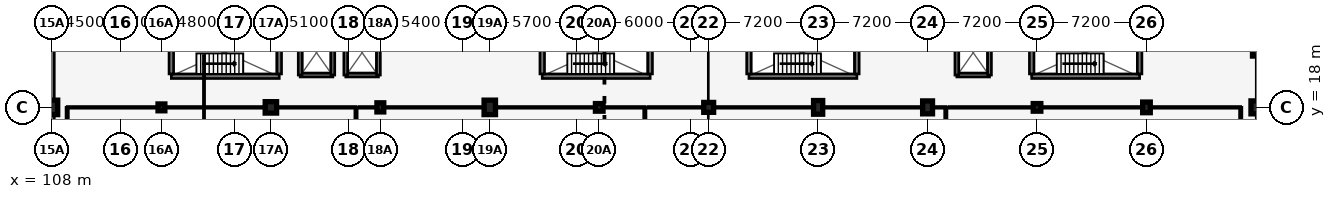
"""IFC4 building model, lengths in metres.
Left out: names, types, materials, properties, quantities, classifications, styles, units other than length and angle.
Written with IfcOpenShell. Run it as: python <this file> out.ifc"""

import sys

from ifc_helpers import new_model, si_unit, direction, frame, frame_2d, origin, origin_2d, place, context, subcontext, project, spatial, rectangle, circle, extrude, element, fill, save


model = new_model("IFC4")
c1 = context("Model", 3, precision=1e-05, world=origin(), true_north=direction((0.0, 1.0)))
c2 = subcontext(c1, "Body", "Model", "MODEL_VIEW")
j1 = project(units=[si_unit("LENGTHUNIT", "METRE"), si_unit("PLANEANGLEUNIT", "RADIAN")], contexts=[c1])
p1 = place(None, origin())
s1 = spatial("IfcSite", under=j1, at=p1, CompositionType="ELEMENT")
p2 = place(p1, origin())
s2 = spatial("IfcBuilding", under=s1, at=p2, CompositionType="ELEMENT")
p3 = place(p2, frame((0.0, 0.0, 4.8)))
s3 = spatial("IfcBuildingStorey", under=s2, at=p3, CompositionType="ELEMENT", Elevation=4.8)
p4 = place(p3, frame((108.0, 18.0, 0.0), z_axis=(0.0, 0.0, 1.0), x_axis=(1.0, 0.0, 0.0)))
e1 = element("IfcColumn", 1, at=p4, inside=s3, PredefinedType="COLUMN", context=c2, shape_type="SweptSolid", body=[
    extrude(rectangle(XDim=0.75, YDim=0.95, at=origin_2d()), origin(), (0.0, 0.0, 1.0), 4.2),
])
p5 = place(p3, frame((115.2, 18.0, 0.0), z_axis=(0.0, 0.0, 1.0), x_axis=(1.0, 0.0, 0.0)))
e2 = element("IfcColumn", 2, at=p5, inside=s3, PredefinedType="COLUMN", context=c2, shape_type="SweptSolid", body=[
    extrude(rectangle(XDim=0.45, YDim=0.45, at=origin_2d()), origin(), (0.0, 0.0, 1.0), 4.2),
])
p6 = place(p3, frame((122.4, 18.0, 0.0), z_axis=(0.0, 0.0, 1.0), x_axis=(1.0, 0.0, 0.0)))
e3 = element("IfcColumn", 3, at=p6, inside=s3, PredefinedType="COLUMN", context=c2, shape_type="SweptSolid", body=[
    extrude(rectangle(XDim=0.75, YDim=0.75, at=origin_2d()), origin(), (0.0, 0.0, 1.0), 4.2),
])
p7 = place(p3, frame((129.6, 18.0, 0.0), z_axis=(0.0, 0.0, 1.0), x_axis=(1.0, 0.0, 0.0)))
e4 = element("IfcColumn", 4, at=p7, inside=s3, PredefinedType="COLUMN", context=c2, shape_type="SweptSolid", body=[
    extrude(rectangle(XDim=0.45, YDim=0.6, at=origin_2d()), origin(), (0.0, 0.0, 1.0), 4.2),
])
p8 = place(p3, frame((136.8, 18.0, 0.0), z_axis=(0.0, 0.0, 1.0), x_axis=(1.0, 0.0, 0.0)))
e5 = element("IfcColumn", 5, at=p8, inside=s3, PredefinedType="COLUMN", context=c2, shape_type="SweptSolid", body=[
    extrude(rectangle(XDim=0.75, YDim=0.95, at=origin_2d()), origin(), (0.0, 0.0, 1.0), 4.2),
])
p9 = place(p3, frame((144.0, 18.0, 0.0), z_axis=(0.0, 0.0, 1.0), x_axis=(1.0, 0.0, 0.0)))
e6 = element("IfcColumn", 6, at=p9, inside=s3, PredefinedType="COLUMN", context=c2, shape_type="SweptSolid", body=[
    extrude(circle(Radius=0.25, at=origin_2d()), origin(), (0.0, 0.0, 1.0), 4.2),
])
p10 = place(p3, frame((151.2, 18.0, 0.0), z_axis=(0.0, 0.0, 1.0), x_axis=(1.0, 0.0, 0.0)))
e7 = element("IfcColumn", 7, at=p10, inside=s3, PredefinedType="COLUMN", context=c2, shape_type="SweptSolid", body=[
    extrude(rectangle(XDim=0.65, YDim=0.65, at=origin_2d()), origin(), (0.0, 0.0, 1.0), 4.2),
])
p11 = place(p3, frame((158.4, 18.0, 0.0), z_axis=(0.0, 0.0, 1.0), x_axis=(1.0, 0.0, 0.0)))
e8 = element("IfcColumn", 8, at=p11, inside=s3, PredefinedType="COLUMN", context=c2, shape_type="SweptSolid", body=[
    extrude(rectangle(XDim=0.6, YDim=0.9, at=origin_2d()), origin(), (0.0, 0.0, 1.0), 4.2),
])
p12 = place(p3, frame((165.6, 18.0, 0.0), z_axis=(0.0, 0.0, 1.0), x_axis=(1.0, 0.0, 0.0)))
e9 = element("IfcColumn", 9, at=p12, inside=s3, PredefinedType="COLUMN", context=c2, shape_type="SweptSolid", body=[
    extrude(rectangle(XDim=0.65, YDim=0.85, at=origin_2d()), origin(), (0.0, 0.0, 1.0), 4.2),
])
p13 = place(p3, frame((172.8, 18.0, 0.0), z_axis=(0.0, 0.0, 1.0), x_axis=(1.0, 0.0, 0.0)))
e10 = element("IfcColumn", 10, at=p13, inside=s3, PredefinedType="COLUMN", context=c2, shape_type="SweptSolid", body=[
    extrude(rectangle(XDim=0.5, YDim=0.5, at=origin_2d()), origin(), (0.0, 0.0, 1.0), 4.2),
])
p14 = place(p3, frame((180.0, 18.0, 0.0), z_axis=(0.0, 0.0, 1.0), x_axis=(1.0, 0.0, 0.0)))
e11 = element("IfcColumn", 11, at=p14, inside=s3, PredefinedType="COLUMN", context=c2, shape_type="SweptSolid", body=[
    extrude(rectangle(XDim=0.5, YDim=0.7, at=origin_2d()), origin(), (0.0, 0.0, 1.0), 4.2),
])
p15 = place(p3, frame((187.2, 18.0, 0.0), z_axis=(0.0, 0.0, 1.0), x_axis=(1.0, 0.0, 0.0)))
e12 = element("IfcColumn", 12, at=p15, inside=s3, PredefinedType="COLUMN", context=c2, shape_type="SweptSolid", body=[
    extrude(rectangle(XDim=0.65, YDim=0.85, at=origin_2d()), origin(), (0.0, 0.0, 1.0), 4.2),
])
p16 = place(p3, frame((187.2, 21.6, 0.0), z_axis=(0.0, 0.0, 1.0), x_axis=(1.0, 0.0, 0.0)))
e13 = element("IfcColumn", 13, at=p16, inside=s3, PredefinedType="COLUMN", context=c2, shape_type="SweptSolid", body=[
    extrude(rectangle(XDim=0.45, YDim=0.45, at=origin_2d()), origin(), (0.0, 0.0, 1.0), 4.2),
])
p17 = place(p3, frame((108.0, 54.0, 0.0), z_axis=(0.0, 0.0, 1.0), x_axis=(0.0, -1.0, 0.0)))
e14 = element("IfcWall", 14, at=p17, inside=s3, PredefinedType="SOLIDWALL", context=c2, shape_type="SweptSolid", body=[
    extrude(rectangle(XDim=43.2, YDim=0.3, at=frame_2d((21.6, 0.0))), origin(), (0.0, 0.0, 1.0), 3.5),
])
p18 = place(p17, frame((2.2, 0.0, 0.72)))
e15 = element("IfcOpeningElement", 15, at=p18, cuts=e14, PredefinedType="OPENING", context=c2, shape_type="SweptSolid", body=[
    extrude(rectangle(XDim=1.8, YDim=2.15, at=frame_2d((0.9, 1.075))), frame((0.0, 0.16, 0.0), z_axis=(0.0, -1.0, 0.0), x_axis=(1.0, 0.0, 0.0)), (0.0, 0.0, 1.0), 0.32),
])
p19 = place(p17, frame((16.6, 0.0, 0.72)))
e16 = element("IfcOpeningElement", 16, at=p19, cuts=e14, PredefinedType="OPENING", context=c2, shape_type="SweptSolid", body=[
    extrude(rectangle(XDim=1.35, YDim=2.05, at=frame_2d((0.675, 1.025))), frame((0.0, 0.16, 0.0), z_axis=(0.0, -1.0, 0.0), x_axis=(1.0, 0.0, 0.0)), (0.0, 0.0, 1.0), 0.32),
])
p20 = place(p17, frame((23.8, 0.0, 0.72)))
e17 = element("IfcOpeningElement", 17, at=p20, cuts=e14, PredefinedType="OPENING", context=c2, shape_type="SweptSolid", body=[
    extrude(rectangle(XDim=1.5, YDim=2.1, at=frame_2d((0.75, 1.05))), frame((0.0, 0.16, 0.0), z_axis=(0.0, -1.0, 0.0), x_axis=(1.0, 0.0, 0.0)), (0.0, 0.0, 1.0), 0.32),
])
p21 = place(p17, frame((31.0, 0.0, 0.72)))
e18 = element("IfcOpeningElement", 18, at=p21, cuts=e14, PredefinedType="OPENING", context=c2, shape_type="SweptSolid", body=[
    extrude(rectangle(XDim=1.65, YDim=2.1, at=frame_2d((0.825, 1.05))), frame((0.0, 0.16, 0.0), z_axis=(0.0, -1.0, 0.0), x_axis=(1.0, 0.0, 0.0)), (0.0, 0.0, 1.0), 0.32),
])
p22 = place(p3, frame((115.85, 20.05, 0.0), z_axis=(0.0, 0.0, 1.0), x_axis=(1.0, 0.0, 0.0)))
e19 = element("IfcWall", 19, at=p22, inside=s3, PredefinedType="SHEAR", context=c2, shape_type="SweptSolid", body=[
    extrude(rectangle(XDim=7.1, YDim=0.3, at=frame_2d((3.55, 0.0))), origin(), (0.0, 0.0, 1.0), 3.84),
])
p23 = place(p22, frame((0.35, 0.0, 0.0)))
e20 = element("IfcOpeningElement", 20, at=p23, cuts=e19, PredefinedType="OPENING", context=c2, shape_type="SweptSolid", body=[
    extrude(rectangle(XDim=1.07, YDim=2.15, at=frame_2d((0.535, 1.075))), frame((0.0, 0.16, 0.0), z_axis=(0.0, -1.0, 0.0), x_axis=(1.0, 0.0, 0.0)), (0.0, 0.0, 1.0), 0.32),
])
for number, where, z_axis, x_axis in (
    (21, (122.95, 20.2, 0.0), (0.0, 0.0, 1.0), (0.0, 1.0, 0.0)),
    (22, (115.85, 23.1, 0.0), (0.0, 0.0, 1.0), (0.0, -1.0, 0.0)),
):
    element("IfcWall", number, at=place(p3, frame(where, z_axis=z_axis, x_axis=x_axis)), inside=s3, PredefinedType="SHEAR", context=c2, shape_type="SweptSolid", body=[
        extrude(rectangle(XDim=2.9, YDim=0.3, at=frame_2d((1.45, 0.0))), origin(), (0.0, 0.0, 1.0), 3.84),
    ])
p24 = place(p3, frame((140.25, 20.05, 0.0), z_axis=(0.0, 0.0, 1.0), x_axis=(1.0, 0.0, 0.0)))
e23 = element("IfcWall", 23, at=p24, inside=s3, PredefinedType="SHEAR", context=c2, shape_type="SweptSolid", body=[
    extrude(rectangle(XDim=7.1, YDim=0.3, at=frame_2d((3.55, 0.0))), origin(), (0.0, 0.0, 1.0), 3.84),
])
p25 = place(p24, frame((0.35, 0.0, 0.0)))
e24 = element("IfcOpeningElement", 24, at=p25, cuts=e23, PredefinedType="OPENING", context=c2, shape_type="SweptSolid", body=[
    extrude(rectangle(XDim=1.07, YDim=2.15, at=frame_2d((0.535, 1.075))), frame((0.0, 0.16, 0.0), z_axis=(0.0, -1.0, 0.0), x_axis=(1.0, 0.0, 0.0)), (0.0, 0.0, 1.0), 0.32),
])
for number, where, z_axis, x_axis in (
    (25, (147.35, 20.2, 0.0), (0.0, 0.0, 1.0), (0.0, 1.0, 0.0)),
    (26, (140.25, 23.1, 0.0), (0.0, 0.0, 1.0), (0.0, -1.0, 0.0)),
):
    element("IfcWall", number, at=place(p3, frame(where, z_axis=z_axis, x_axis=x_axis)), inside=s3, PredefinedType="SHEAR", context=c2, shape_type="SweptSolid", body=[
        extrude(rectangle(XDim=2.9, YDim=0.3, at=frame_2d((1.45, 0.0))), origin(), (0.0, 0.0, 1.0), 3.84),
    ])
p26 = place(p3, frame((153.85, 20.05, 0.0), z_axis=(0.0, 0.0, 1.0), x_axis=(1.0, 0.0, 0.0)))
e27 = element("IfcWall", 27, at=p26, inside=s3, PredefinedType="SHEAR", context=c2, shape_type="SweptSolid", body=[
    extrude(rectangle(XDim=7.1, YDim=0.3, at=frame_2d((3.55, 0.0))), origin(), (0.0, 0.0, 1.0), 3.84),
])
p27 = place(p26, frame((0.35, 0.0, 0.0)))
e28 = element("IfcOpeningElement", 28, at=p27, cuts=e27, PredefinedType="OPENING", context=c2, shape_type="SweptSolid", body=[
    extrude(rectangle(XDim=1.07, YDim=2.15, at=frame_2d((0.535, 1.075))), frame((0.0, 0.16, 0.0), z_axis=(0.0, -1.0, 0.0), x_axis=(1.0, 0.0, 0.0)), (0.0, 0.0, 1.0), 0.32),
])
for number, where, z_axis, x_axis in (
    (29, (160.95, 20.2, 0.0), (0.0, 0.0, 1.0), (0.0, 1.0, 0.0)),
    (30, (153.85, 23.1, 0.0), (0.0, 0.0, 1.0), (0.0, -1.0, 0.0)),
):
    element("IfcWall", number, at=place(p3, frame(where, z_axis=z_axis, x_axis=x_axis)), inside=s3, PredefinedType="SHEAR", context=c2, shape_type="SweptSolid", body=[
        extrude(rectangle(XDim=2.9, YDim=0.3, at=frame_2d((1.45, 0.0))), origin(), (0.0, 0.0, 1.0), 3.84),
    ])
p28 = place(p3, frame((172.45, 20.05, 0.0), z_axis=(0.0, 0.0, 1.0), x_axis=(1.0, 0.0, 0.0)))
e31 = element("IfcWall", 31, at=p28, inside=s3, PredefinedType="SHEAR", context=c2, shape_type="SweptSolid", body=[
    extrude(rectangle(XDim=7.1, YDim=0.3, at=frame_2d((3.55, 0.0))), origin(), (0.0, 0.0, 1.0), 3.84),
])
p29 = place(p28, frame((0.35, 0.0, 0.0)))
e32 = element("IfcOpeningElement", 32, at=p29, cuts=e31, PredefinedType="OPENING", context=c2, shape_type="SweptSolid", body=[
    extrude(rectangle(XDim=1.07, YDim=2.15, at=frame_2d((0.535, 1.075))), frame((0.0, 0.16, 0.0), z_axis=(0.0, -1.0, 0.0), x_axis=(1.0, 0.0, 0.0)), (0.0, 0.0, 1.0), 0.32),
])
for number, where, z_axis, x_axis in (
    (33, (179.55, 20.2, 0.0), (0.0, 0.0, 1.0), (0.0, 1.0, 0.0)),
    (34, (172.45, 23.1, 0.0), (0.0, 0.0, 1.0), (0.0, -1.0, 0.0)),
):
    element("IfcWall", number, at=place(p3, frame(where, z_axis=z_axis, x_axis=x_axis)), inside=s3, PredefinedType="SHEAR", context=c2, shape_type="SweptSolid", body=[
        extrude(rectangle(XDim=2.9, YDim=0.3, at=frame_2d((1.45, 0.0))), origin(), (0.0, 0.0, 1.0), 3.84),
    ])
p30 = place(p3, frame((124.325, 20.125, 0.0), z_axis=(0.0, 0.0, 1.0), x_axis=(1.0, 0.0, 0.0)))
e35 = element("IfcWall", 35, at=p30, inside=s3, PredefinedType="SHEAR", context=c2, shape_type="SweptSolid", body=[
    extrude(rectangle(XDim=2.15, YDim=0.25, at=frame_2d((1.075, 0.0))), origin(), (0.0, 0.0, 1.0), 3.9),
])
for number, where, z_axis, x_axis in (
    (36, (124.325, 23.075, 0.0), (0.0, 0.0, 1.0), (0.0, -1.0, 0.0)),
    (37, (126.475, 20.125, 0.0), (0.0, 0.0, 1.0), (0.0, 1.0, 0.0)),
):
    element("IfcWall", number, at=place(p3, frame(where, z_axis=z_axis, x_axis=x_axis)), inside=s3, PredefinedType="SHEAR", context=c2, shape_type="SweptSolid", body=[
        extrude(rectangle(XDim=2.95, YDim=0.25, at=frame_2d((1.475, 0.0))), origin(), (0.0, 0.0, 1.0), 3.9),
    ])
p31 = place(p3, frame((127.325, 20.125, 0.0), z_axis=(0.0, 0.0, 1.0), x_axis=(1.0, 0.0, 0.0)))
e38 = element("IfcWall", 38, at=p31, inside=s3, PredefinedType="SHEAR", context=c2, shape_type="SweptSolid", body=[
    extrude(rectangle(XDim=2.15, YDim=0.25, at=frame_2d((1.075, 0.0))), origin(), (0.0, 0.0, 1.0), 3.9),
])
for number, where, z_axis, x_axis in (
    (39, (127.325, 23.075, 0.0), (0.0, 0.0, 1.0), (0.0, -1.0, 0.0)),
    (40, (129.475, 20.125, 0.0), (0.0, 0.0, 1.0), (0.0, 1.0, 0.0)),
):
    element("IfcWall", number, at=place(p3, frame(where, z_axis=z_axis, x_axis=x_axis)), inside=s3, PredefinedType="SHEAR", context=c2, shape_type="SweptSolid", body=[
        extrude(rectangle(XDim=2.95, YDim=0.25, at=frame_2d((1.475, 0.0))), origin(), (0.0, 0.0, 1.0), 3.9),
    ])
p32 = place(p3, frame((167.525, 20.125, 0.0), z_axis=(0.0, 0.0, 1.0), x_axis=(1.0, 0.0, 0.0)))
e41 = element("IfcWall", 41, at=p32, inside=s3, PredefinedType="SHEAR", context=c2, shape_type="SweptSolid", body=[
    extrude(rectangle(XDim=2.15, YDim=0.25, at=frame_2d((1.075, 0.0))), origin(), (0.0, 0.0, 1.0), 3.9),
])
for number, where, z_axis, x_axis in (
    (42, (167.525, 23.075, 0.0), (0.0, 0.0, 1.0), (0.0, -1.0, 0.0)),
    (43, (169.675, 20.125, 0.0), (0.0, 0.0, 1.0), (0.0, 1.0, 0.0)),
):
    element("IfcWall", number, at=place(p3, frame(where, z_axis=z_axis, x_axis=x_axis)), inside=s3, PredefinedType="SHEAR", context=c2, shape_type="SweptSolid", body=[
        extrude(rectangle(XDim=2.95, YDim=0.25, at=frame_2d((1.475, 0.0))), origin(), (0.0, 0.0, 1.0), 3.9),
    ])
p33 = place(p3, frame((128.0, 11.85, 0.0), z_axis=(0.0, 0.0, 1.0), x_axis=(0.0, 1.0, 0.0)))
e44 = element("IfcWall", 44, at=p33, inside=s3, PredefinedType="PARTITIONING", context=c2, shape_type="SweptSolid", body=[
    extrude(rectangle(XDim=6.15, YDim=0.15, at=frame_2d((3.075, 0.0))), origin(), (0.0, 0.0, 1.0), 2.922),
])
p34 = place(p3, frame((109.0, 18.0, 0.0), z_axis=(0.0, 0.0, 1.0), x_axis=(0.0, -1.0, 0.0)))
e45 = element("IfcWall", 45, at=p34, inside=s3, PredefinedType="PARTITIONING", context=c2, shape_type="SweptSolid", body=[
    extrude(rectangle(XDim=6.15, YDim=0.15, at=frame_2d((3.075, 0.0))), origin(), (0.0, 0.0, 1.0), 3.022),
])
p35 = place(p3, frame((109.0, 18.0, 0.0), z_axis=(0.0, 0.0, 1.0), x_axis=(1.0, 0.0, 0.0)))
e46 = element("IfcWall", 46, at=p35, inside=s3, PredefinedType="PARTITIONING", context=c2, shape_type="SweptSolid", body=[
    extrude(rectangle(XDim=19.0, YDim=0.11, at=frame_2d((9.5, 0.0))), origin(), (0.0, 0.0, 1.0), 2.922),
])
p36 = place(p35, frame((8.98, 0.0, 0.0)))
e47 = element("IfcOpeningElement", 47, at=p36, cuts=e46, PredefinedType="OPENING", context=c2, shape_type="SweptSolid", body=[
    extrude(rectangle(XDim=1.04, YDim=2.15, at=frame_2d((0.52, 1.075))), frame((0.0, 0.065, 0.0), z_axis=(0.0, -1.0, 0.0), x_axis=(1.0, 0.0, 0.0)), (0.0, 0.0, 1.0), 0.13),
])
p37 = place(p3, frame((147.0, 11.85, 0.0), z_axis=(0.0, 0.0, 1.0), x_axis=(0.0, 1.0, 0.0)))
e48 = element("IfcWall", 48, at=p37, inside=s3, PredefinedType="PARTITIONING", context=c2, shape_type="SweptSolid", body=[
    extrude(rectangle(XDim=6.15, YDim=0.15, at=frame_2d((3.075, 0.0))), origin(), (0.0, 0.0, 1.0), 3.372),
])
p38 = place(p3, frame((128.2, 18.0, 0.0), z_axis=(0.0, 0.0, 1.0), x_axis=(1.0, 0.0, 0.0)))
e49 = element("IfcWall", 49, at=p38, inside=s3, PredefinedType="PARTITIONING", context=c2, shape_type="SweptSolid", body=[
    extrude(rectangle(XDim=18.8, YDim=0.11, at=frame_2d((9.4, 0.0))), origin(), (0.0, 0.0, 1.0), 2.822),
])
p39 = place(p38, frame((5.322, 0.0, 0.0)))
e50 = element("IfcOpeningElement", 50, at=p39, cuts=e49, PredefinedType="OPENING", context=c2, shape_type="SweptSolid", body=[
    extrude(rectangle(XDim=1.06, YDim=2.15, at=frame_2d((0.53, 1.075))), frame((0.0, 0.065, 0.0), z_axis=(0.0, -1.0, 0.0), x_axis=(1.0, 0.0, 0.0)), (0.0, 0.0, 1.0), 0.13),
])
p40 = place(p3, frame((166.8, 11.85, 0.0), z_axis=(0.0, 0.0, 1.0), x_axis=(0.0, 1.0, 0.0)))
e51 = element("IfcWall", 51, at=p40, inside=s3, PredefinedType="PARTITIONING", context=c2, shape_type="SweptSolid", body=[
    extrude(rectangle(XDim=6.15, YDim=0.15, at=frame_2d((3.075, 0.0))), origin(), (0.0, 0.0, 1.0), 3.272),
])
p41 = place(p3, frame((147.2, 18.0, 0.0), z_axis=(0.0, 0.0, 1.0), x_axis=(1.0, 0.0, 0.0)))
e52 = element("IfcWall", 52, at=p41, inside=s3, PredefinedType="PARTITIONING", context=c2, shape_type="SweptSolid", body=[
    extrude(rectangle(XDim=19.6, YDim=0.11, at=frame_2d((9.8, 0.0))), origin(), (0.0, 0.0, 1.0), 3.222),
])
p42 = place(p41, frame((9.28, 0.0, 0.0)))
e53 = element("IfcOpeningElement", 53, at=p42, cuts=e52, PredefinedType="OPENING", context=c2, shape_type="SweptSolid", body=[
    extrude(rectangle(XDim=1.04, YDim=2.15, at=frame_2d((0.52, 1.075))), frame((0.0, 0.065, 0.0), z_axis=(0.0, -1.0, 0.0), x_axis=(1.0, 0.0, 0.0)), (0.0, 0.0, 1.0), 0.13),
])
p43 = place(p3, frame((186.2, 11.85, 0.0), z_axis=(0.0, 0.0, 1.0), x_axis=(0.0, 1.0, 0.0)))
e54 = element("IfcWall", 54, at=p43, inside=s3, PredefinedType="PARTITIONING", context=c2, shape_type="SweptSolid", body=[
    extrude(rectangle(XDim=6.15, YDim=0.15, at=frame_2d((3.075, 0.0))), origin(), (0.0, 0.0, 1.0), 3.222),
])
p44 = place(p3, frame((167.0, 18.0, 0.0), z_axis=(0.0, 0.0, 1.0), x_axis=(1.0, 0.0, 0.0)))
e55 = element("IfcWall", 55, at=p44, inside=s3, PredefinedType="PARTITIONING", context=c2, shape_type="SweptSolid", body=[
    extrude(rectangle(XDim=19.2, YDim=0.11, at=frame_2d((9.6, 0.0))), origin(), (0.0, 0.0, 1.0), 3.172),
])
p45 = place(p44, frame((8.7, 0.0, 0.0)))
e56 = element("IfcOpeningElement", 56, at=p45, cuts=e55, PredefinedType="OPENING", context=c2, shape_type="SweptSolid", body=[
    extrude(rectangle(XDim=1.8, YDim=2.2, at=frame_2d((0.9, 1.1))), frame((0.0, 0.065, 0.0), z_axis=(0.0, -1.0, 0.0), x_axis=(1.0, 0.0, 0.0)), (0.0, 0.0, 1.0), 0.13),
])
p46 = place(p21, origin())
e57 = element("IfcWindow", 57, at=p46, inside=s3, PartitioningType="SINGLE_PANEL", PredefinedType="WINDOW", context=c2, shape_type="SweptSolid", body=[
    extrude(rectangle(XDim=1.65, YDim=2.1, at=frame_2d((0.825, 1.05))), frame((0.0, 0.03, 0.0), z_axis=(0.0, -1.0, 0.0), x_axis=(1.0, 0.0, 0.0)), (0.0, 0.0, 1.0), 0.06),
])
fill(e18, e57)
p47 = place(p23, origin())
e58 = element("IfcDoor", 58, at=p47, inside=s3, OperationType="SINGLE_SWING_RIGHT", PredefinedType="DOOR", context=c2, shape_type="SweptSolid", body=[
    extrude(rectangle(XDim=1.07, YDim=2.15, at=frame_2d((0.535, 1.075))), frame((0.0, 0.025, 0.0), z_axis=(0.0, -1.0, 0.0), x_axis=(1.0, 0.0, 0.0)), (0.0, 0.0, 1.0), 0.05),
])
fill(e20, e58)
p48 = place(p25, origin())
e59 = element("IfcDoor", 59, at=p48, inside=s3, OperationType="SINGLE_SWING_RIGHT", PredefinedType="DOOR", context=c2, shape_type="SweptSolid", body=[
    extrude(rectangle(XDim=1.07, YDim=2.15, at=frame_2d((0.535, 1.075))), frame((0.0, 0.025, 0.0), z_axis=(0.0, -1.0, 0.0), x_axis=(1.0, 0.0, 0.0)), (0.0, 0.0, 1.0), 0.05),
])
fill(e24, e59)
p49 = place(p27, origin())
e60 = element("IfcDoor", 60, at=p49, inside=s3, OperationType="SINGLE_SWING_RIGHT", PredefinedType="DOOR", context=c2, shape_type="SweptSolid", body=[
    extrude(rectangle(XDim=1.07, YDim=2.15, at=frame_2d((0.535, 1.075))), frame((0.0, 0.025, 0.0), z_axis=(0.0, -1.0, 0.0), x_axis=(1.0, 0.0, 0.0)), (0.0, 0.0, 1.0), 0.05),
])
fill(e28, e60)
p50 = place(p29, origin())
e61 = element("IfcDoor", 61, at=p50, inside=s3, OperationType="SINGLE_SWING_RIGHT", PredefinedType="DOOR", context=c2, shape_type="SweptSolid", body=[
    extrude(rectangle(XDim=1.07, YDim=2.15, at=frame_2d((0.535, 1.075))), frame((0.0, 0.025, 0.0), z_axis=(0.0, -1.0, 0.0), x_axis=(1.0, 0.0, 0.0)), (0.0, 0.0, 1.0), 0.05),
])
fill(e32, e61)
p51 = place(p36, origin())
e62 = element("IfcDoor", 62, at=p51, inside=s3, OperationType="SINGLE_SWING_LEFT", PredefinedType="DOOR", context=c2, shape_type="SweptSolid", body=[
    extrude(rectangle(XDim=1.04, YDim=2.15, at=frame_2d((0.52, 1.075))), frame((0.0, 0.025, 0.0), z_axis=(0.0, -1.0, 0.0), x_axis=(1.0, 0.0, 0.0)), (0.0, 0.0, 1.0), 0.05),
])
fill(e47, e62)
p52 = place(p39, origin())
e63 = element("IfcDoor", 63, at=p52, inside=s3, OperationType="SINGLE_SWING_RIGHT", PredefinedType="DOOR", context=c2, shape_type="SweptSolid", body=[
    extrude(rectangle(XDim=1.06, YDim=2.15, at=frame_2d((0.53, 1.075))), frame((0.0, 0.025, 0.0), z_axis=(0.0, -1.0, 0.0), x_axis=(1.0, 0.0, 0.0)), (0.0, 0.0, 1.0), 0.05),
])
fill(e50, e63)
p53 = place(p42, origin())
e64 = element("IfcDoor", 64, at=p53, inside=s3, OperationType="SINGLE_SWING_LEFT", PredefinedType="DOOR", context=c2, shape_type="SweptSolid", body=[
    extrude(rectangle(XDim=1.04, YDim=2.15, at=frame_2d((0.52, 1.075))), frame((0.0, 0.025, 0.0), z_axis=(0.0, -1.0, 0.0), x_axis=(1.0, 0.0, 0.0)), (0.0, 0.0, 1.0), 0.05),
])
fill(e53, e64)
p54 = place(p45, origin())
e65 = element("IfcDoor", 65, at=p54, inside=s3, OperationType="DOUBLE_SWING_RIGHT", PredefinedType="DOOR", context=c2, shape_type="SweptSolid", body=[
    extrude(rectangle(XDim=1.8, YDim=2.2, at=frame_2d((0.9, 1.1))), frame((0.0, 0.025, 0.0), z_axis=(0.0, -1.0, 0.0), x_axis=(1.0, 0.0, 0.0)), (0.0, 0.0, 1.0), 0.05),
])
fill(e56, e65)
save(model, sys.argv[1])
